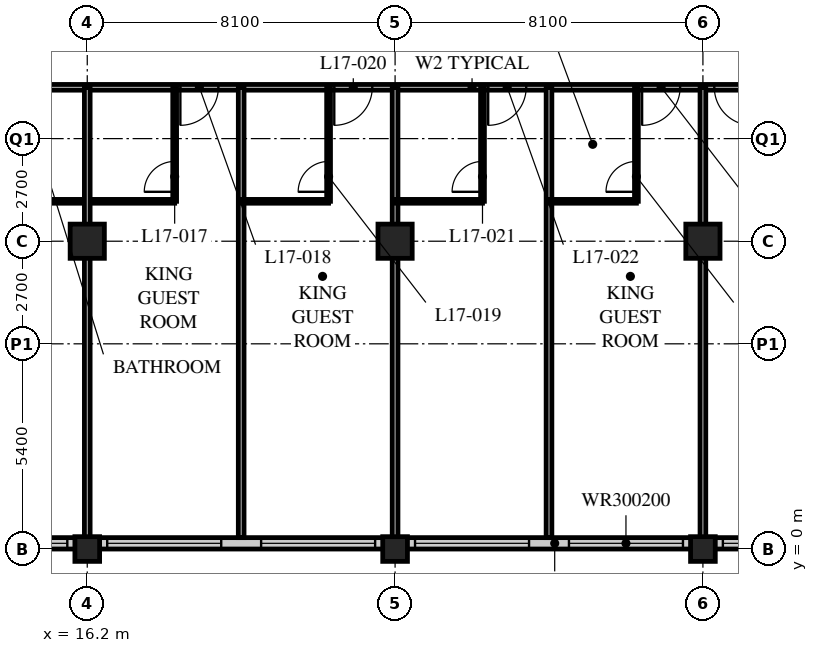
"""IFC4 building model, lengths in metres.
Left out: names, types, materials, properties, quantities, classifications, styles, units other than length and angle.
Written with IfcOpenShell. Run it as: python <this file> out.ifc"""

import sys

from ifc_helpers import new_model, si_unit, direction, frame, frame_2d, origin, origin_2d, place, context, subcontext, project, spatial, rectangle, hollow_rectangle, extrude, element, fill, save


model = new_model("IFC4")
c1 = context("Model", 3, precision=1e-05, world=origin(), true_north=direction((0.0, 1.0)))
c2 = subcontext(c1, "Body", "Model", "MODEL_VIEW")
j1 = project(units=[si_unit("LENGTHUNIT", "METRE"), si_unit("PLANEANGLEUNIT", "RADIAN")], contexts=[c1])
p1 = place(None, origin())
s1 = spatial("IfcSite", under=j1, at=p1, CompositionType="ELEMENT")
p2 = place(p1, origin())
s2 = spatial("IfcBuilding", under=s1, at=p2, CompositionType="ELEMENT")
p3 = place(p2, frame((0.0, 0.0, 70.4)))
s3 = spatial("IfcBuildingStorey", under=s2, at=p3, CompositionType="ELEMENT", Elevation=70.4)
p4 = place(p3, frame((16.2, 0.0, 0.0), z_axis=(0.0, 0.0, 1.0), x_axis=(1.0, 0.0, 0.0)))
e1 = element("IfcColumn", 1, at=p4, inside=s3, PredefinedType="COLUMN", context=c2, shape_type="SweptSolid", body=[
    extrude(hollow_rectangle(XDim=0.65, YDim=0.65, WallThickness=0.05, at=origin_2d()), origin(), (0.0, 0.0, 1.0), 3.4),
])
p5 = place(p3, frame((16.2, 8.1, 0.0), z_axis=(0.0, 0.0, 1.0), x_axis=(1.0, 0.0, 0.0)))
e2 = element("IfcColumn", 2, at=p5, inside=s3, PredefinedType="COLUMN", context=c2, shape_type="SweptSolid", body=[
    extrude(hollow_rectangle(XDim=0.9, YDim=0.9, WallThickness=0.09, at=origin_2d()), origin(), (0.0, 0.0, 1.0), 3.4),
])
p6 = place(p3, frame((24.3, 0.0, 0.0), z_axis=(0.0, 0.0, 1.0), x_axis=(1.0, 0.0, 0.0)))
e3 = element("IfcColumn", 3, at=p6, inside=s3, PredefinedType="COLUMN", context=c2, shape_type="SweptSolid", body=[
    extrude(hollow_rectangle(XDim=0.65, YDim=0.65, WallThickness=0.05, at=origin_2d()), origin(), (0.0, 0.0, 1.0), 3.4),
])
p7 = place(p3, frame((24.3, 8.1, 0.0), z_axis=(0.0, 0.0, 1.0), x_axis=(1.0, 0.0, 0.0)))
e4 = element("IfcColumn", 4, at=p7, inside=s3, PredefinedType="COLUMN", context=c2, shape_type="SweptSolid", body=[
    extrude(hollow_rectangle(XDim=0.9, YDim=0.9, WallThickness=0.09, at=origin_2d()), origin(), (0.0, 0.0, 1.0), 3.4),
])
p8 = place(p3, frame((32.4, 0.0, 0.0), z_axis=(0.0, 0.0, 1.0), x_axis=(1.0, 0.0, 0.0)))
e5 = element("IfcColumn", 5, at=p8, inside=s3, PredefinedType="COLUMN", context=c2, shape_type="SweptSolid", body=[
    extrude(hollow_rectangle(XDim=0.65, YDim=0.65, WallThickness=0.05, at=origin_2d()), origin(), (0.0, 0.0, 1.0), 3.4),
])
p9 = place(p3, frame((32.4, 8.1, 0.0), z_axis=(0.0, 0.0, 1.0), x_axis=(1.0, 0.0, 0.0)))
e6 = element("IfcColumn", 6, at=p9, inside=s3, PredefinedType="COLUMN", context=c2, shape_type="SweptSolid", body=[
    extrude(hollow_rectangle(XDim=0.9, YDim=0.9, WallThickness=0.09, at=origin_2d()), origin(), (0.0, 0.0, 1.0), 3.4),
])
p10 = place(p3, frame((8.4, 0.15, 0.0), z_axis=(0.0, 0.0, 1.0), x_axis=(1.0, 0.0, 0.0)))
e7 = element("IfcWall", 7, at=p10, inside=s3, PredefinedType="SOLIDWALL", context=c2, shape_type="SweptSolid", body=[
    extrude(rectangle(XDim=40.2, YDim=0.3, at=frame_2d((20.1, 0.0))), origin(), (0.0, 0.0, 1.0), 3.19),
])
p11 = place(p10, frame((0.225, 0.0, 0.9)))
e8 = element("IfcOpeningElement", 8, at=p11, cuts=e7, PredefinedType="OPENING", context=c2, shape_type="SweptSolid", body=[
    extrude(rectangle(XDim=3.0, YDim=2.0, at=frame_2d((1.5, 1.0))), frame((0.0, 0.16, 0.0), z_axis=(0.0, -1.0, 0.0), x_axis=(1.0, 0.0, 0.0)), (0.0, 0.0, 1.0), 0.32),
])
p12 = place(p10, frame((4.275, 0.0, 0.9)))
e9 = element("IfcOpeningElement", 9, at=p12, cuts=e7, PredefinedType="OPENING", context=c2, shape_type="SweptSolid", body=[
    extrude(rectangle(XDim=3.0, YDim=2.0, at=frame_2d((1.5, 1.0))), frame((0.0, 0.16, 0.0), z_axis=(0.0, -1.0, 0.0), x_axis=(1.0, 0.0, 0.0)), (0.0, 0.0, 1.0), 0.32),
])
p13 = place(p10, frame((8.325, 0.0, 0.9)))
e10 = element("IfcOpeningElement", 10, at=p13, cuts=e7, PredefinedType="OPENING", context=c2, shape_type="SweptSolid", body=[
    extrude(rectangle(XDim=3.0, YDim=2.0, at=frame_2d((1.5, 1.0))), frame((0.0, 0.16, 0.0), z_axis=(0.0, -1.0, 0.0), x_axis=(1.0, 0.0, 0.0)), (0.0, 0.0, 1.0), 0.32),
])
p14 = place(p10, frame((12.375, 0.0, 0.9)))
e11 = element("IfcOpeningElement", 11, at=p14, cuts=e7, PredefinedType="OPENING", context=c2, shape_type="SweptSolid", body=[
    extrude(rectangle(XDim=3.0, YDim=2.0, at=frame_2d((1.5, 1.0))), frame((0.0, 0.16, 0.0), z_axis=(0.0, -1.0, 0.0), x_axis=(1.0, 0.0, 0.0)), (0.0, 0.0, 1.0), 0.32),
])
p15 = place(p10, frame((16.425, 0.0, 0.9)))
e12 = element("IfcOpeningElement", 12, at=p15, cuts=e7, PredefinedType="OPENING", context=c2, shape_type="SweptSolid", body=[
    extrude(rectangle(XDim=3.0, YDim=2.0, at=frame_2d((1.5, 1.0))), frame((0.0, 0.16, 0.0), z_axis=(0.0, -1.0, 0.0), x_axis=(1.0, 0.0, 0.0)), (0.0, 0.0, 1.0), 0.32),
])
p16 = place(p10, frame((20.475, 0.0, 0.9)))
e13 = element("IfcOpeningElement", 13, at=p16, cuts=e7, PredefinedType="OPENING", context=c2, shape_type="SweptSolid", body=[
    extrude(rectangle(XDim=3.0, YDim=2.0, at=frame_2d((1.5, 1.0))), frame((0.0, 0.16, 0.0), z_axis=(0.0, -1.0, 0.0), x_axis=(1.0, 0.0, 0.0)), (0.0, 0.0, 1.0), 0.32),
])
p17 = place(p10, frame((24.525, 0.0, 0.9)))
e14 = element("IfcOpeningElement", 14, at=p17, cuts=e7, PredefinedType="OPENING", context=c2, shape_type="SweptSolid", body=[
    extrude(rectangle(XDim=3.0, YDim=2.0, at=frame_2d((1.5, 1.0))), frame((0.0, 0.16, 0.0), z_axis=(0.0, -1.0, 0.0), x_axis=(1.0, 0.0, 0.0)), (0.0, 0.0, 1.0), 0.32),
])
p18 = place(p10, frame((28.575, 0.0, 0.9)))
e15 = element("IfcOpeningElement", 15, at=p18, cuts=e7, PredefinedType="OPENING", context=c2, shape_type="SweptSolid", body=[
    extrude(rectangle(XDim=3.0, YDim=2.0, at=frame_2d((1.5, 1.0))), frame((0.0, 0.16, 0.0), z_axis=(0.0, -1.0, 0.0), x_axis=(1.0, 0.0, 0.0)), (0.0, 0.0, 1.0), 0.32),
])
p19 = place(p10, frame((32.625, 0.0, 0.9)))
e16 = element("IfcOpeningElement", 16, at=p19, cuts=e7, PredefinedType="OPENING", context=c2, shape_type="SweptSolid", body=[
    extrude(rectangle(XDim=3.0, YDim=2.0, at=frame_2d((1.5, 1.0))), frame((0.0, 0.16, 0.0), z_axis=(0.0, -1.0, 0.0), x_axis=(1.0, 0.0, 0.0)), (0.0, 0.0, 1.0), 0.32),
])
p20 = place(p10, frame((36.675, 0.0, 0.9)))
e17 = element("IfcOpeningElement", 17, at=p20, cuts=e7, PredefinedType="OPENING", context=c2, shape_type="SweptSolid", body=[
    extrude(rectangle(XDim=3.0, YDim=2.0, at=frame_2d((1.5, 1.0))), frame((0.0, 0.16, 0.0), z_axis=(0.0, -1.0, 0.0), x_axis=(1.0, 0.0, 0.0)), (0.0, 0.0, 1.0), 0.32),
])
p21 = place(p3, frame((8.1, 12.15, 0.0), z_axis=(0.0, 0.0, 1.0), x_axis=(1.0, 0.0, 0.0)))
e18 = element("IfcWall", 18, at=p21, inside=s3, PredefinedType="PARTITIONING", context=c2, shape_type="SweptSolid", body=[
    extrude(rectangle(XDim=36.45, YDim=0.15, at=frame_2d((18.225, 0.0))), origin(), (0.0, 0.0, 1.0), 3.19),
])
p22 = place(p21, frame((4.35, 0.0, 0.0)))
e19 = element("IfcOpeningElement", 19, at=p22, cuts=e18, PredefinedType="OPENING", context=c2, shape_type="SweptSolid", body=[
    extrude(rectangle(XDim=1.0, YDim=2.1, at=frame_2d((0.5, 1.05))), frame((0.0, 0.085, 0.0), z_axis=(0.0, -1.0, 0.0), x_axis=(1.0, 0.0, 0.0)), (0.0, 0.0, 1.0), 0.17),
])
p23 = place(p21, frame((10.55, 0.0, 0.0)))
e20 = element("IfcOpeningElement", 20, at=p23, cuts=e18, PredefinedType="OPENING", context=c2, shape_type="SweptSolid", body=[
    extrude(rectangle(XDim=1.0, YDim=2.1, at=frame_2d((0.5, 1.05))), frame((0.0, 0.085, 0.0), z_axis=(0.0, -1.0, 0.0), x_axis=(1.0, 0.0, 0.0)), (0.0, 0.0, 1.0), 0.17),
])
p24 = place(p21, frame((14.6, 0.0, 0.0)))
e21 = element("IfcOpeningElement", 21, at=p24, cuts=e18, PredefinedType="OPENING", context=c2, shape_type="SweptSolid", body=[
    extrude(rectangle(XDim=1.0, YDim=2.1, at=frame_2d((0.5, 1.05))), frame((0.0, 0.085, 0.0), z_axis=(0.0, -1.0, 0.0), x_axis=(1.0, 0.0, 0.0)), (0.0, 0.0, 1.0), 0.17),
])
p25 = place(p21, frame((18.65, 0.0, 0.0)))
e22 = element("IfcOpeningElement", 22, at=p25, cuts=e18, PredefinedType="OPENING", context=c2, shape_type="SweptSolid", body=[
    extrude(rectangle(XDim=1.0, YDim=2.1, at=frame_2d((0.5, 1.05))), frame((0.0, 0.085, 0.0), z_axis=(0.0, -1.0, 0.0), x_axis=(1.0, 0.0, 0.0)), (0.0, 0.0, 1.0), 0.17),
])
p26 = place(p21, frame((22.7, 0.0, 0.0)))
e23 = element("IfcOpeningElement", 23, at=p26, cuts=e18, PredefinedType="OPENING", context=c2, shape_type="SweptSolid", body=[
    extrude(rectangle(XDim=1.0, YDim=2.1, at=frame_2d((0.5, 1.05))), frame((0.0, 0.085, 0.0), z_axis=(0.0, -1.0, 0.0), x_axis=(1.0, 0.0, 0.0)), (0.0, 0.0, 1.0), 0.17),
])
p27 = place(p21, frame((24.6, 0.0, 0.0)))
e24 = element("IfcOpeningElement", 24, at=p27, cuts=e18, PredefinedType="OPENING", context=c2, shape_type="SweptSolid", body=[
    extrude(rectangle(XDim=1.0, YDim=2.1, at=frame_2d((0.5, 1.05))), frame((0.0, 0.085, 0.0), z_axis=(0.0, -1.0, 0.0), x_axis=(1.0, 0.0, 0.0)), (0.0, 0.0, 1.0), 0.17),
])
p28 = place(p21, frame((30.8, 0.0, 0.0)))
e25 = element("IfcOpeningElement", 25, at=p28, cuts=e18, PredefinedType="OPENING", context=c2, shape_type="SweptSolid", body=[
    extrude(rectangle(XDim=1.0, YDim=2.1, at=frame_2d((0.5, 1.05))), frame((0.0, 0.085, 0.0), z_axis=(0.0, -1.0, 0.0), x_axis=(1.0, 0.0, 0.0)), (0.0, 0.0, 1.0), 0.17),
])
p29 = place(p21, frame((1.525, 0.0, 0.0)))
e26 = element("IfcOpeningElement", 26, at=p29, cuts=e18, PredefinedType="OPENING", context=c2, shape_type="SweptSolid", body=[
    extrude(rectangle(XDim=1.0, YDim=2.1, at=frame_2d((0.5, 1.05))), frame((0.0, 0.085, 0.0), z_axis=(0.0, -1.0, 0.0), x_axis=(1.0, 0.0, 0.0)), (0.0, 0.0, 1.0), 0.17),
])
p30 = place(p21, frame((33.925, 0.0, 0.0)))
e27 = element("IfcOpeningElement", 27, at=p30, cuts=e18, PredefinedType="OPENING", context=c2, shape_type="SweptSolid", body=[
    extrude(rectangle(XDim=1.0, YDim=2.1, at=frame_2d((0.5, 1.05))), frame((0.0, 0.085, 0.0), z_axis=(0.0, -1.0, 0.0), x_axis=(1.0, 0.0, 0.0)), (0.0, 0.0, 1.0), 0.17),
])
p31 = place(p3, frame((13.6, 9.15, 0.0), z_axis=(0.0, 0.0, 1.0), x_axis=(1.0, 0.0, 0.0)))
e28 = element("IfcWall", 28, at=p31, inside=s3, PredefinedType="PARTITIONING", context=c2, shape_type="SweptSolid", body=[
    extrude(rectangle(XDim=4.9, YDim=0.1, at=frame_2d((2.45, 0.0))), origin(), (0.0, 0.0, 1.0), 3.19),
])
p32 = place(p3, frame((16.2, 12.15, 0.0), z_axis=(0.0, 0.0, 1.0), x_axis=(0.0, -1.0, 0.0)))
e29 = element("IfcWall", 29, at=p32, inside=s3, PredefinedType="PARTITIONING", context=c2, shape_type="SweptSolid", body=[
    extrude(rectangle(XDim=11.85, YDim=0.15, at=frame_2d((5.925, 0.0))), origin(), (0.0, 0.0, 1.0), 2.578),
])
p33 = place(p3, frame((18.5, 12.15, 0.0), z_axis=(0.0, 0.0, 1.0), x_axis=(0.0, -1.0, 0.0)))
e30 = element("IfcWall", 30, at=p33, inside=s3, PredefinedType="PARTITIONING", context=c2, shape_type="SweptSolid", body=[
    extrude(rectangle(XDim=3.0, YDim=0.1, at=frame_2d((1.5, 0.0))), origin(), (0.0, 0.0, 1.0), 3.19),
])
p34 = place(p33, frame((1.95, 0.0, 0.0)))
e31 = element("IfcOpeningElement", 31, at=p34, cuts=e30, PredefinedType="OPENING", context=c2, shape_type="SweptSolid", body=[
    extrude(rectangle(XDim=0.8, YDim=2.1, at=frame_2d((0.4, 1.05))), frame((0.0, 0.06, 0.0), z_axis=(0.0, -1.0, 0.0), x_axis=(1.0, 0.0, 0.0)), (0.0, 0.0, 1.0), 0.12),
])
p35 = place(p3, frame((20.25, 12.15, 0.0), z_axis=(0.0, 0.0, 1.0), x_axis=(0.0, -1.0, 0.0)))
e32 = element("IfcWall", 32, at=p35, inside=s3, PredefinedType="PARTITIONING", context=c2, shape_type="SweptSolid", body=[
    extrude(rectangle(XDim=11.85, YDim=0.15, at=frame_2d((5.925, 0.0))), origin(), (0.0, 0.0, 1.0), 3.19),
])
p36 = place(p3, frame((20.25, 9.15, 0.0), z_axis=(0.0, 0.0, 1.0), x_axis=(1.0, 0.0, 0.0)))
e33 = element("IfcWall", 33, at=p36, inside=s3, PredefinedType="PARTITIONING", context=c2, shape_type="SweptSolid", body=[
    extrude(rectangle(XDim=2.3, YDim=0.1, at=frame_2d((1.15, 0.0))), origin(), (0.0, 0.0, 1.0), 3.19),
])
p37 = place(p3, frame((22.55, 12.15, 0.0), z_axis=(0.0, 0.0, 1.0), x_axis=(0.0, -1.0, 0.0)))
e34 = element("IfcWall", 34, at=p37, inside=s3, PredefinedType="PARTITIONING", context=c2, shape_type="SweptSolid", body=[
    extrude(rectangle(XDim=3.0, YDim=0.1, at=frame_2d((1.5, 0.0))), origin(), (0.0, 0.0, 1.0), 3.19),
])
p38 = place(p37, frame((1.95, 0.0, 0.0)))
e35 = element("IfcOpeningElement", 35, at=p38, cuts=e34, PredefinedType="OPENING", context=c2, shape_type="SweptSolid", body=[
    extrude(rectangle(XDim=0.8, YDim=2.1, at=frame_2d((0.4, 1.05))), frame((0.0, 0.06, 0.0), z_axis=(0.0, -1.0, 0.0), x_axis=(1.0, 0.0, 0.0)), (0.0, 0.0, 1.0), 0.12),
])
p39 = place(p3, frame((24.3, 12.15, 0.0), z_axis=(0.0, 0.0, 1.0), x_axis=(0.0, -1.0, 0.0)))
e36 = element("IfcWall", 36, at=p39, inside=s3, PredefinedType="PARTITIONING", context=c2, shape_type="SweptSolid", body=[
    extrude(rectangle(XDim=11.85, YDim=0.15, at=frame_2d((5.925, 0.0))), origin(), (0.0, 0.0, 1.0), 2.578),
])
p40 = place(p3, frame((24.3, 9.15, 0.0), z_axis=(0.0, 0.0, 1.0), x_axis=(1.0, 0.0, 0.0)))
e37 = element("IfcWall", 37, at=p40, inside=s3, PredefinedType="PARTITIONING", context=c2, shape_type="SweptSolid", body=[
    extrude(rectangle(XDim=2.3, YDim=0.1, at=frame_2d((1.15, 0.0))), origin(), (0.0, 0.0, 1.0), 3.19),
])
p41 = place(p3, frame((26.6, 12.15, 0.0), z_axis=(0.0, 0.0, 1.0), x_axis=(0.0, -1.0, 0.0)))
e38 = element("IfcWall", 38, at=p41, inside=s3, PredefinedType="PARTITIONING", context=c2, shape_type="SweptSolid", body=[
    extrude(rectangle(XDim=3.0, YDim=0.1, at=frame_2d((1.5, 0.0))), origin(), (0.0, 0.0, 1.0), 3.19),
])
p42 = place(p41, frame((1.95, 0.0, 0.0)))
e39 = element("IfcOpeningElement", 39, at=p42, cuts=e38, PredefinedType="OPENING", context=c2, shape_type="SweptSolid", body=[
    extrude(rectangle(XDim=0.8, YDim=2.1, at=frame_2d((0.4, 1.05))), frame((0.0, 0.06, 0.0), z_axis=(0.0, -1.0, 0.0), x_axis=(1.0, 0.0, 0.0)), (0.0, 0.0, 1.0), 0.12),
])
p43 = place(p3, frame((28.35, 12.15, 0.0), z_axis=(0.0, 0.0, 1.0), x_axis=(0.0, -1.0, 0.0)))
e40 = element("IfcWall", 40, at=p43, inside=s3, PredefinedType="PARTITIONING", context=c2, shape_type="SweptSolid", body=[
    extrude(rectangle(XDim=11.85, YDim=0.15, at=frame_2d((5.925, 0.0))), origin(), (0.0, 0.0, 1.0), 3.19),
])
p44 = place(p3, frame((28.35, 9.15, 0.0), z_axis=(0.0, 0.0, 1.0), x_axis=(1.0, 0.0, 0.0)))
e41 = element("IfcWall", 41, at=p44, inside=s3, PredefinedType="PARTITIONING", context=c2, shape_type="SweptSolid", body=[
    extrude(rectangle(XDim=2.3, YDim=0.1, at=frame_2d((1.15, 0.0))), origin(), (0.0, 0.0, 1.0), 3.19),
])
p45 = place(p3, frame((30.65, 12.15, 0.0), z_axis=(0.0, 0.0, 1.0), x_axis=(0.0, -1.0, 0.0)))
e42 = element("IfcWall", 42, at=p45, inside=s3, PredefinedType="PARTITIONING", context=c2, shape_type="SweptSolid", body=[
    extrude(rectangle(XDim=3.0, YDim=0.1, at=frame_2d((1.5, 0.0))), origin(), (0.0, 0.0, 1.0), 3.19),
])
p46 = place(p45, frame((1.95, 0.0, 0.0)))
e43 = element("IfcOpeningElement", 43, at=p46, cuts=e42, PredefinedType="OPENING", context=c2, shape_type="SweptSolid", body=[
    extrude(rectangle(XDim=0.8, YDim=2.1, at=frame_2d((0.4, 1.05))), frame((0.0, 0.06, 0.0), z_axis=(0.0, -1.0, 0.0), x_axis=(1.0, 0.0, 0.0)), (0.0, 0.0, 1.0), 0.12),
])
p47 = place(p3, frame((32.4, 12.15, 0.0), z_axis=(0.0, 0.0, 1.0), x_axis=(0.0, -1.0, 0.0)))
e44 = element("IfcWall", 44, at=p47, inside=s3, PredefinedType="PARTITIONING", context=c2, shape_type="SweptSolid", body=[
    extrude(rectangle(XDim=11.85, YDim=0.15, at=frame_2d((5.925, 0.0))), origin(), (0.0, 0.0, 1.0), 2.578),
])
p48 = place(p12, origin())
e45 = element("IfcWindow", 45, at=p48, inside=s3, PartitioningType="SINGLE_PANEL", PredefinedType="WINDOW", context=c2, shape_type="SweptSolid", body=[
    extrude(rectangle(XDim=3.0, YDim=2.0, at=frame_2d((1.5, 1.0))), frame((0.0, 0.03, 0.0), z_axis=(0.0, -1.0, 0.0), x_axis=(1.0, 0.0, 0.0)), (0.0, 0.0, 1.0), 0.06),
])
fill(e9, e45)
p49 = place(p13, origin())
e46 = element("IfcWindow", 46, at=p49, inside=s3, PartitioningType="SINGLE_PANEL", PredefinedType="WINDOW", context=c2, shape_type="SweptSolid", body=[
    extrude(rectangle(XDim=3.0, YDim=2.0, at=frame_2d((1.5, 1.0))), frame((0.0, 0.03, 0.0), z_axis=(0.0, -1.0, 0.0), x_axis=(1.0, 0.0, 0.0)), (0.0, 0.0, 1.0), 0.06),
])
fill(e10, e46)
p50 = place(p14, origin())
e47 = element("IfcWindow", 47, at=p50, inside=s3, PartitioningType="SINGLE_PANEL", PredefinedType="WINDOW", context=c2, shape_type="SweptSolid", body=[
    extrude(rectangle(XDim=3.0, YDim=2.0, at=frame_2d((1.5, 1.0))), frame((0.0, 0.03, 0.0), z_axis=(0.0, -1.0, 0.0), x_axis=(1.0, 0.0, 0.0)), (0.0, 0.0, 1.0), 0.06),
])
fill(e11, e47)
p51 = place(p15, origin())
e48 = element("IfcWindow", 48, at=p51, inside=s3, PartitioningType="SINGLE_PANEL", PredefinedType="WINDOW", context=c2, shape_type="SweptSolid", body=[
    extrude(rectangle(XDim=3.0, YDim=2.0, at=frame_2d((1.5, 1.0))), frame((0.0, 0.03, 0.0), z_axis=(0.0, -1.0, 0.0), x_axis=(1.0, 0.0, 0.0)), (0.0, 0.0, 1.0), 0.06),
])
fill(e12, e48)
p52 = place(p16, origin())
e49 = element("IfcWindow", 49, at=p52, inside=s3, PartitioningType="SINGLE_PANEL", PredefinedType="WINDOW", context=c2, shape_type="SweptSolid", body=[
    extrude(rectangle(XDim=3.0, YDim=2.0, at=frame_2d((1.5, 1.0))), frame((0.0, 0.03, 0.0), z_axis=(0.0, -1.0, 0.0), x_axis=(1.0, 0.0, 0.0)), (0.0, 0.0, 1.0), 0.06),
])
fill(e13, e49)
p53 = place(p17, origin())
e50 = element("IfcWindow", 50, at=p53, inside=s3, PartitioningType="SINGLE_PANEL", PredefinedType="WINDOW", context=c2, shape_type="SweptSolid", body=[
    extrude(rectangle(XDim=3.0, YDim=2.0, at=frame_2d((1.5, 1.0))), frame((0.0, 0.03, 0.0), z_axis=(0.0, -1.0, 0.0), x_axis=(1.0, 0.0, 0.0)), (0.0, 0.0, 1.0), 0.06),
])
fill(e14, e50)
p54 = place(p34, origin())
e51 = element("IfcDoor", 51, at=p54, inside=s3, OperationType="SINGLE_SWING_LEFT", PredefinedType="DOOR", context=c2, shape_type="SweptSolid", body=[
    extrude(rectangle(XDim=0.8, YDim=2.1, at=frame_2d((0.4, 1.05))), frame((0.0, 0.025, 0.0), z_axis=(0.0, -1.0, 0.0), x_axis=(1.0, 0.0, 0.0)), (0.0, 0.0, 1.0), 0.05),
])
fill(e31, e51)
p55 = place(p23, origin())
e52 = element("IfcDoor", 52, at=p55, inside=s3, OperationType="SINGLE_SWING_RIGHT", PredefinedType="DOOR", context=c2, shape_type="SweptSolid", body=[
    extrude(rectangle(XDim=1.0, YDim=2.1, at=frame_2d((0.5, 1.05))), frame((0.0, 0.025, 0.0), z_axis=(0.0, -1.0, 0.0), x_axis=(1.0, 0.0, 0.0)), (0.0, 0.0, 1.0), 0.05),
])
fill(e20, e52)
p56 = place(p38, origin())
e53 = element("IfcDoor", 53, at=p56, inside=s3, OperationType="SINGLE_SWING_LEFT", PredefinedType="DOOR", context=c2, shape_type="SweptSolid", body=[
    extrude(rectangle(XDim=0.8, YDim=2.1, at=frame_2d((0.4, 1.05))), frame((0.0, 0.025, 0.0), z_axis=(0.0, -1.0, 0.0), x_axis=(1.0, 0.0, 0.0)), (0.0, 0.0, 1.0), 0.05),
])
fill(e35, e53)
p57 = place(p24, origin())
e54 = element("IfcDoor", 54, at=p57, inside=s3, OperationType="SINGLE_SWING_RIGHT", PredefinedType="DOOR", context=c2, shape_type="SweptSolid", body=[
    extrude(rectangle(XDim=1.0, YDim=2.1, at=frame_2d((0.5, 1.05))), frame((0.0, 0.025, 0.0), z_axis=(0.0, -1.0, 0.0), x_axis=(1.0, 0.0, 0.0)), (0.0, 0.0, 1.0), 0.05),
])
fill(e21, e54)
p58 = place(p42, origin())
e55 = element("IfcDoor", 55, at=p58, inside=s3, OperationType="SINGLE_SWING_LEFT", PredefinedType="DOOR", context=c2, shape_type="SweptSolid", body=[
    extrude(rectangle(XDim=0.8, YDim=2.1, at=frame_2d((0.4, 1.05))), frame((0.0, 0.025, 0.0), z_axis=(0.0, -1.0, 0.0), x_axis=(1.0, 0.0, 0.0)), (0.0, 0.0, 1.0), 0.05),
])
fill(e39, e55)
p59 = place(p25, origin())
e56 = element("IfcDoor", 56, at=p59, inside=s3, OperationType="SINGLE_SWING_RIGHT", PredefinedType="DOOR", context=c2, shape_type="SweptSolid", body=[
    extrude(rectangle(XDim=1.0, YDim=2.1, at=frame_2d((0.5, 1.05))), frame((0.0, 0.025, 0.0), z_axis=(0.0, -1.0, 0.0), x_axis=(1.0, 0.0, 0.0)), (0.0, 0.0, 1.0), 0.05),
])
fill(e22, e56)
p60 = place(p46, origin())
e57 = element("IfcDoor", 57, at=p60, inside=s3, OperationType="SINGLE_SWING_LEFT", PredefinedType="DOOR", context=c2, shape_type="SweptSolid", body=[
    extrude(rectangle(XDim=0.8, YDim=2.1, at=frame_2d((0.4, 1.05))), frame((0.0, 0.025, 0.0), z_axis=(0.0, -1.0, 0.0), x_axis=(1.0, 0.0, 0.0)), (0.0, 0.0, 1.0), 0.05),
])
fill(e43, e57)
p61 = place(p26, origin())
e58 = element("IfcDoor", 58, at=p61, inside=s3, OperationType="SINGLE_SWING_RIGHT", PredefinedType="DOOR", context=c2, shape_type="SweptSolid", body=[
    extrude(rectangle(XDim=1.0, YDim=2.1, at=frame_2d((0.5, 1.05))), frame((0.0, 0.025, 0.0), z_axis=(0.0, -1.0, 0.0), x_axis=(1.0, 0.0, 0.0)), (0.0, 0.0, 1.0), 0.05),
])
fill(e23, e58)
p62 = place(p27, origin())
e59 = element("IfcDoor", 59, at=p62, inside=s3, OperationType="SINGLE_SWING_LEFT", PredefinedType="DOOR", context=c2, shape_type="SweptSolid", body=[
    extrude(rectangle(XDim=1.0, YDim=2.1, at=frame_2d((0.5, 1.05))), frame((0.0, 0.025, 0.0), z_axis=(0.0, -1.0, 0.0), x_axis=(1.0, 0.0, 0.0)), (0.0, 0.0, 1.0), 0.05),
])
fill(e24, e59)
save(model, sys.argv[1])
